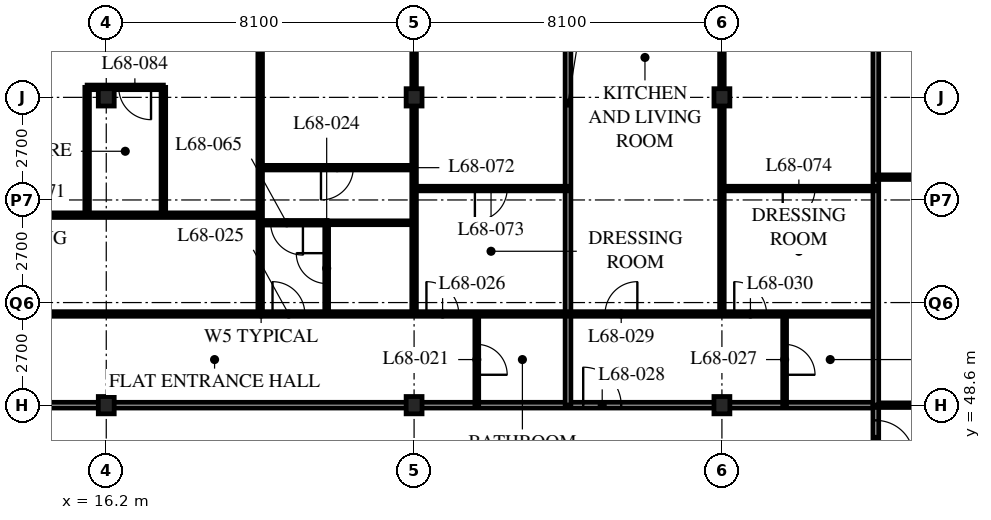
"""IFC4 building model, lengths in metres.
Left out: names, types, materials, properties, quantities, classifications, styles, units other than length and angle.
Written with IfcOpenShell. Run it as: python <this file> out.ifc"""

import sys

from ifc_helpers import new_model, si_unit, direction, frame, frame_2d, origin, origin_2d, place, context, subcontext, project, spatial, rectangle, i_section, extrude, element, fill, save


model = new_model("IFC4")
c1 = context("Model", 3, precision=1e-05, world=origin(), true_north=direction((0.0, 1.0)))
c2 = subcontext(c1, "Body", "Model", "MODEL_VIEW")
j1 = project(units=[si_unit("LENGTHUNIT", "METRE"), si_unit("PLANEANGLEUNIT", "RADIAN")], contexts=[c1])
p1 = place(None, origin())
s1 = spatial("IfcSite", under=j1, at=p1, CompositionType="ELEMENT")
p2 = place(p1, origin())
s2 = spatial("IfcBuilding", under=s1, at=p2, CompositionType="ELEMENT")
p3 = place(p2, frame((0.0, 0.0, 265.8)))
s3 = spatial("IfcBuildingStorey", under=s2, at=p3, CompositionType="ELEMENT", Elevation=265.8)
for number, where, z_axis, x_axis in (
    (1, (16.2, 48.6, 0.0), (0.0, 0.0, 1.0), (1.0, 0.0, 0.0)),
    (2, (16.2, 56.7, 0.0), (0.0, 0.0, 1.0), (1.0, 0.0, 0.0)),
    (3, (24.3, 48.6, 0.0), (0.0, 0.0, 1.0), (1.0, 0.0, 0.0)),
    (4, (24.3, 56.7, 0.0), (0.0, 0.0, 1.0), (1.0, 0.0, 0.0)),
    (5, (32.4, 48.6, 0.0), (0.0, 0.0, 1.0), (1.0, 0.0, 0.0)),
    (6, (32.4, 56.7, 0.0), (0.0, 0.0, 1.0), (1.0, 0.0, 0.0)),
):
    element("IfcColumn", number, at=place(p3, frame(where, z_axis=z_axis, x_axis=x_axis)), inside=s3, PredefinedType="COLUMN", context=c2, shape_type="SweptSolid", body=[
        extrude(i_section(OverallWidth=0.418, OverallDepth=0.456, WebThickness=0.042, FlangeThickness=0.067, FilletRadius=0.015, at=origin_2d()), origin(), (0.0, 0.0, 1.0), 3.9),
    ])
p4 = place(p3, frame((8.1, 48.6, 0.0), z_axis=(0.0, 0.0, 1.0), x_axis=(1.0, 0.0, 0.0)))
e7 = element("IfcWall", 7, at=p4, inside=s3, PredefinedType="PARTITIONING", context=c2, shape_type="SweptSolid", body=[
    extrude(rectangle(XDim=28.35, YDim=0.15, at=frame_2d((14.175, 0.0))), origin(), (0.0, 0.0, 1.0), 3.078),
])
p5 = place(p4, frame((4.45, 0.0, 0.0)))
e8 = element("IfcOpeningElement", 8, at=p5, cuts=e7, PredefinedType="OPENING", context=c2, shape_type="SweptSolid", body=[
    extrude(rectangle(XDim=1.0, YDim=2.1, at=frame_2d((0.5, 1.05))), frame((0.0, 0.085, 0.0), z_axis=(0.0, -1.0, 0.0), x_axis=(1.0, 0.0, 0.0)), (0.0, 0.0, 1.0), 0.17),
])
p6 = place(p4, frame((20.65, 0.0, 0.0)))
e9 = element("IfcOpeningElement", 9, at=p6, cuts=e7, PredefinedType="OPENING", context=c2, shape_type="SweptSolid", body=[
    extrude(rectangle(XDim=1.0, YDim=2.1, at=frame_2d((0.5, 1.05))), frame((0.0, 0.085, 0.0), z_axis=(0.0, -1.0, 0.0), x_axis=(1.0, 0.0, 0.0)), (0.0, 0.0, 1.0), 0.17),
])
p7 = place(p4, frame((1.525, 0.0, 0.0)))
e10 = element("IfcOpeningElement", 10, at=p7, cuts=e7, PredefinedType="OPENING", context=c2, shape_type="SweptSolid", body=[
    extrude(rectangle(XDim=1.0, YDim=2.1, at=frame_2d((0.5, 1.05))), frame((0.0, 0.085, 0.0), z_axis=(0.0, -1.0, 0.0), x_axis=(1.0, 0.0, 0.0)), (0.0, 0.0, 1.0), 0.17),
])
p8 = place(p3, frame((36.45, 46.8, 0.0), z_axis=(0.0, 0.0, 1.0), x_axis=(0.0, 1.0, 0.0)))
e11 = element("IfcWall", 11, at=p8, inside=s3, PredefinedType="PARTITIONING", context=c2, shape_type="SweptSolid", body=[
    extrude(rectangle(XDim=1.8, YDim=0.15, at=frame_2d((0.9, 0.0))), origin(), (0.0, 0.0, 1.0), 3.69),
])
p9 = place(p8, frame((0.4, 0.0, 0.0)))
e12 = element("IfcOpeningElement", 12, at=p9, cuts=e11, PredefinedType="OPENING", context=c2, shape_type="SweptSolid", body=[
    extrude(rectangle(XDim=1.0, YDim=2.1, at=frame_2d((0.5, 1.05))), frame((0.0, 0.085, 0.0), z_axis=(0.0, -1.0, 0.0), x_axis=(1.0, 0.0, 0.0)), (0.0, 0.0, 1.0), 0.17),
])
p10 = place(p3, frame((25.95, 48.6, 0.0), z_axis=(0.0, 0.0, 1.0), x_axis=(0.0, 1.0, 0.0)))
e13 = element("IfcWall", 13, at=p10, inside=s3, PredefinedType="PARTITIONING", context=c2, shape_type="SweptSolid", body=[
    extrude(rectangle(XDim=2.4, YDim=0.1, at=frame_2d((1.2, 0.0))), origin(), (0.0, 0.0, 1.0), 3.69),
])
p11 = place(p10, frame((0.8, 0.0, 0.0)))
e14 = element("IfcOpeningElement", 14, at=p11, cuts=e13, PredefinedType="OPENING", context=c2, shape_type="SweptSolid", body=[
    extrude(rectangle(XDim=0.8, YDim=2.1, at=frame_2d((0.4, 1.05))), frame((0.0, 0.06, 0.0), z_axis=(0.0, -1.0, 0.0), x_axis=(1.0, 0.0, 0.0)), (0.0, 0.0, 1.0), 0.12),
])
p12 = place(p3, frame((22.0, 51.0, 0.0), z_axis=(0.0, 0.0, 1.0), x_axis=(0.0, 1.0, 0.0)))
e15 = element("IfcWall", 15, at=p12, inside=s3, PredefinedType="PARTITIONING", context=c2, shape_type="SweptSolid", body=[
    extrude(rectangle(XDim=2.4, YDim=0.1, at=frame_2d((1.2, 0.0))), origin(), (0.0, 0.0, 1.0), 3.69),
])
p13 = place(p12, frame((0.8, 0.0, 0.0)))
e16 = element("IfcOpeningElement", 16, at=p13, cuts=e15, PredefinedType="OPENING", context=c2, shape_type="SweptSolid", body=[
    extrude(rectangle(XDim=0.8, YDim=2.1, at=frame_2d((0.4, 1.05))), frame((0.0, 0.06, 0.0), z_axis=(0.0, -1.0, 0.0), x_axis=(1.0, 0.0, 0.0)), (0.0, 0.0, 1.0), 0.12),
])
p14 = place(p3, frame((22.0, 53.4, 0.0), z_axis=(0.0, 0.0, 1.0), x_axis=(1.0, 0.0, 0.0)))
e17 = element("IfcWall", 17, at=p14, inside=s3, PredefinedType="PARTITIONING", context=c2, shape_type="SweptSolid", body=[
    extrude(rectangle(XDim=2.3, YDim=0.1, at=frame_2d((1.15, 0.0))), origin(), (0.0, 0.0, 1.0), 3.69),
])
p15 = place(p3, frame((20.25, 51.0, 0.0), z_axis=(0.0, 0.0, 1.0), x_axis=(0.0, 1.0, 0.0)))
e18 = element("IfcWall", 18, at=p15, inside=s3, PredefinedType="PARTITIONING", context=c2, shape_type="SweptSolid", body=[
    extrude(rectangle(XDim=13.5, YDim=0.12, at=frame_2d((6.75, 0.0))), origin(), (0.0, 0.0, 1.0), 3.69),
])
p16 = place(p3, frame((24.3, 51.0, 0.0), z_axis=(0.0, 0.0, 1.0), x_axis=(0.0, 1.0, 0.0)))
e19 = element("IfcWall", 19, at=p16, inside=s3, PredefinedType="PARTITIONING", context=c2, shape_type="SweptSolid", body=[
    extrude(rectangle(XDim=13.5, YDim=0.12, at=frame_2d((6.75, 0.0))), origin(), (0.0, 0.0, 1.0), 3.078),
])
p17 = place(p3, frame((28.35, 48.6, 0.0), z_axis=(0.0, 0.0, 1.0), x_axis=(0.0, 1.0, 0.0)))
e20 = element("IfcWall", 20, at=p17, inside=s3, PredefinedType="PARTITIONING", context=c2, shape_type="SweptSolid", body=[
    extrude(rectangle(XDim=15.9, YDim=0.15, at=frame_2d((7.95, 0.0))), origin(), (0.0, 0.0, 1.0), 3.69),
])
p18 = place(p3, frame((34.05, 48.6, 0.0), z_axis=(0.0, 0.0, 1.0), x_axis=(0.0, 1.0, 0.0)))
e21 = element("IfcWall", 21, at=p18, inside=s3, PredefinedType="PARTITIONING", context=c2, shape_type="SweptSolid", body=[
    extrude(rectangle(XDim=2.4, YDim=0.1, at=frame_2d((1.2, 0.0))), origin(), (0.0, 0.0, 1.0), 3.69),
])
p19 = place(p18, frame((0.8, 0.0, 0.0)))
e22 = element("IfcOpeningElement", 22, at=p19, cuts=e21, PredefinedType="OPENING", context=c2, shape_type="SweptSolid", body=[
    extrude(rectangle(XDim=0.8, YDim=2.1, at=frame_2d((0.4, 1.05))), frame((0.0, 0.06, 0.0), z_axis=(0.0, -1.0, 0.0), x_axis=(1.0, 0.0, 0.0)), (0.0, 0.0, 1.0), 0.12),
])
p20 = place(p3, frame((32.4, 51.0, 0.0), z_axis=(0.0, 0.0, 1.0), x_axis=(0.0, 1.0, 0.0)))
e23 = element("IfcWall", 23, at=p20, inside=s3, PredefinedType="PARTITIONING", context=c2, shape_type="SweptSolid", body=[
    extrude(rectangle(XDim=13.5, YDim=0.12, at=frame_2d((6.75, 0.0))), origin(), (0.0, 0.0, 1.0), 3.078),
])
p21 = place(p3, frame((4.1, 51.0, 0.0), z_axis=(0.0, 0.0, 1.0), x_axis=(1.0, 0.0, 0.0)))
e24 = element("IfcWall", 24, at=p21, inside=s3, PredefinedType="PARTITIONING", context=c2, shape_type="SweptSolid", body=[
    extrude(rectangle(XDim=32.35, YDim=0.12, at=frame_2d((16.175, 0.0))), origin(), (0.0, 0.0, 1.0), 3.69),
])
p22 = place(p21, frame((9.025, 0.0, 0.0)))
e25 = element("IfcOpeningElement", 25, at=p22, cuts=e24, PredefinedType="OPENING", context=c2, shape_type="SweptSolid", body=[
    extrude(rectangle(XDim=0.85, YDim=2.1, at=frame_2d((0.425, 1.05))), frame((0.0, 0.07, 0.0), z_axis=(0.0, -1.0, 0.0), x_axis=(1.0, 0.0, 0.0)), (0.0, 0.0, 1.0), 0.14),
])
p23 = place(p21, frame((16.475, 0.0, 0.0)))
e26 = element("IfcOpeningElement", 26, at=p23, cuts=e24, PredefinedType="OPENING", context=c2, shape_type="SweptSolid", body=[
    extrude(rectangle(XDim=0.85, YDim=2.1, at=frame_2d((0.425, 1.05))), frame((0.0, 0.07, 0.0), z_axis=(0.0, -1.0, 0.0), x_axis=(1.0, 0.0, 0.0)), (0.0, 0.0, 1.0), 0.14),
])
p24 = place(p21, frame((20.525, 0.0, 0.0)))
e27 = element("IfcOpeningElement", 27, at=p24, cuts=e24, PredefinedType="OPENING", context=c2, shape_type="SweptSolid", body=[
    extrude(rectangle(XDim=0.85, YDim=2.1, at=frame_2d((0.425, 1.05))), frame((0.0, 0.07, 0.0), z_axis=(0.0, -1.0, 0.0), x_axis=(1.0, 0.0, 0.0)), (0.0, 0.0, 1.0), 0.14),
])
p25 = place(p21, frame((25.225, 0.0, 0.0)))
e28 = element("IfcOpeningElement", 28, at=p25, cuts=e24, PredefinedType="OPENING", context=c2, shape_type="SweptSolid", body=[
    extrude(rectangle(XDim=0.85, YDim=2.1, at=frame_2d((0.425, 1.05))), frame((0.0, 0.07, 0.0), z_axis=(0.0, -1.0, 0.0), x_axis=(1.0, 0.0, 0.0)), (0.0, 0.0, 1.0), 0.14),
])
p26 = place(p21, frame((28.625, 0.0, 0.0)))
e29 = element("IfcOpeningElement", 29, at=p26, cuts=e24, PredefinedType="OPENING", context=c2, shape_type="SweptSolid", body=[
    extrude(rectangle(XDim=0.85, YDim=2.1, at=frame_2d((0.425, 1.05))), frame((0.0, 0.07, 0.0), z_axis=(0.0, -1.0, 0.0), x_axis=(1.0, 0.0, 0.0)), (0.0, 0.0, 1.0), 0.14),
])
p27 = place(p21, frame((6.725, 0.0, 0.0)))
e30 = element("IfcOpeningElement", 30, at=p27, cuts=e24, PredefinedType="OPENING", context=c2, shape_type="SweptSolid", body=[
    extrude(rectangle(XDim=0.85, YDim=2.1, at=frame_2d((0.425, 1.05))), frame((0.0, 0.07, 0.0), z_axis=(0.0, -1.0, 0.0), x_axis=(1.0, 0.0, 0.0)), (0.0, 0.0, 1.0), 0.14),
])
p28 = place(p21, frame((2.875, 0.0, 0.0)))
e31 = element("IfcOpeningElement", 31, at=p28, cuts=e24, PredefinedType="OPENING", context=c2, shape_type="SweptSolid", body=[
    extrude(rectangle(XDim=0.85, YDim=2.1, at=frame_2d((0.425, 1.05))), frame((0.0, 0.07, 0.0), z_axis=(0.0, -1.0, 0.0), x_axis=(1.0, 0.0, 0.0)), (0.0, 0.0, 1.0), 0.14),
])
p29 = place(p3, frame((36.45, 48.6, 0.0), z_axis=(0.0, 0.0, 1.0), x_axis=(1.0, 0.0, 0.0)))
e32 = element("IfcWall", 32, at=p29, inside=s3, PredefinedType="PARTITIONING", context=c2, shape_type="SweptSolid", body=[
    extrude(rectangle(XDim=6.45, YDim=0.12, at=frame_2d((3.225, 0.0))), origin(), (0.0, 0.0, 1.0), 3.078),
])
p30 = place(p29, frame((2.3, 0.0, 0.0)))
e33 = element("IfcOpeningElement", 33, at=p30, cuts=e32, PredefinedType="OPENING", context=c2, shape_type="SweptSolid", body=[
    extrude(rectangle(XDim=0.85, YDim=2.1, at=frame_2d((0.425, 1.05))), frame((0.0, 0.07, 0.0), z_axis=(0.0, -1.0, 0.0), x_axis=(1.0, 0.0, 0.0)), (0.0, 0.0, 1.0), 0.14),
])
p31 = place(p3, frame((36.45, 64.5, 0.0), z_axis=(0.0, 0.0, 1.0), x_axis=(0.0, -1.0, 0.0)))
e34 = element("IfcWall", 34, at=p31, inside=s3, PredefinedType="PARTITIONING", context=c2, shape_type="SweptSolid", body=[
    extrude(rectangle(XDim=15.9, YDim=0.15, at=frame_2d((7.95, 0.0))), origin(), (0.0, 0.0, 1.0), 3.69),
])
p32 = place(p3, frame((36.45, 54.6, 0.0), z_axis=(0.0, 0.0, 1.0), x_axis=(1.0, 0.0, 0.0)))
e35 = element("IfcWall", 35, at=p32, inside=s3, PredefinedType="PARTITIONING", context=c2, shape_type="SweptSolid", body=[
    extrude(rectangle(XDim=19.95, YDim=0.12, at=frame_2d((9.975, 0.0))), origin(), (0.0, 0.0, 1.0), 3.69),
])
p33 = place(p32, frame((1.675, 0.0, 0.0)))
e36 = element("IfcOpeningElement", 36, at=p33, cuts=e35, PredefinedType="OPENING", context=c2, shape_type="SweptSolid", body=[
    extrude(rectangle(XDim=0.85, YDim=2.1, at=frame_2d((0.425, 1.05))), frame((0.0, 0.07, 0.0), z_axis=(0.0, -1.0, 0.0), x_axis=(1.0, 0.0, 0.0)), (0.0, 0.0, 1.0), 0.14),
])
p34 = place(p3, frame((20.25, 53.4, 0.0), z_axis=(0.0, 0.0, 1.0), x_axis=(1.0, 0.0, 0.0)))
e37 = element("IfcWall", 37, at=p34, inside=s3, PredefinedType="PARTITIONING", context=c2, shape_type="SweptSolid", body=[
    extrude(rectangle(XDim=1.76, YDim=0.12, at=frame_2d((0.88, 0.0))), origin(), (0.0, 0.0, 1.0), 3.69),
])
p35 = place(p34, frame((0.275, 0.0, 0.0)))
e38 = element("IfcOpeningElement", 38, at=p35, cuts=e37, PredefinedType="OPENING", context=c2, shape_type="SweptSolid", body=[
    extrude(rectangle(XDim=0.85, YDim=2.1, at=frame_2d((0.425, 1.05))), frame((0.0, 0.07, 0.0), z_axis=(0.0, -1.0, 0.0), x_axis=(1.0, 0.0, 0.0)), (0.0, 0.0, 1.0), 0.14),
])
p36 = place(p3, frame((12.15, 53.6, 0.0), z_axis=(0.0, 0.0, 1.0), x_axis=(1.0, 0.0, 0.0)))
e39 = element("IfcWall", 39, at=p36, inside=s3, PredefinedType="PARTITIONING", context=c2, shape_type="SweptSolid", body=[
    extrude(rectangle(XDim=8.1, YDim=0.12, at=frame_2d((4.05, 0.0))), origin(), (0.0, 0.0, 1.0), 3.69),
])
p37 = place(p36, frame((1.675, 0.0, 0.0)))
e40 = element("IfcOpeningElement", 40, at=p37, cuts=e39, PredefinedType="OPENING", context=c2, shape_type="SweptSolid", body=[
    extrude(rectangle(XDim=0.85, YDim=2.1, at=frame_2d((0.425, 1.05))), frame((0.0, 0.07, 0.0), z_axis=(0.0, -1.0, 0.0), x_axis=(1.0, 0.0, 0.0)), (0.0, 0.0, 1.0), 0.14),
])
p38 = place(p3, frame((20.25, 54.85, 0.0), z_axis=(0.0, 0.0, 1.0), x_axis=(1.0, 0.0, 0.0)))
e41 = element("IfcWall", 41, at=p38, inside=s3, PredefinedType="PARTITIONING", context=c2, shape_type="SweptSolid", body=[
    extrude(rectangle(XDim=4.05, YDim=0.12, at=frame_2d((2.025, 0.0))), origin(), (0.0, 0.0, 1.0), 3.69),
])
p39 = place(p38, frame((1.6, 0.0, 0.0)))
e42 = element("IfcOpeningElement", 42, at=p39, cuts=e41, PredefinedType="OPENING", context=c2, shape_type="SweptSolid", body=[
    extrude(rectangle(XDim=0.85, YDim=2.1, at=frame_2d((0.425, 1.05))), frame((0.0, 0.07, 0.0), z_axis=(0.0, -1.0, 0.0), x_axis=(1.0, 0.0, 0.0)), (0.0, 0.0, 1.0), 0.14),
])
p40 = place(p3, frame((24.3, 54.3, 0.0), z_axis=(0.0, 0.0, 1.0), x_axis=(1.0, 0.0, 0.0)))
e43 = element("IfcWall", 43, at=p40, inside=s3, PredefinedType="PARTITIONING", context=c2, shape_type="SweptSolid", body=[
    extrude(rectangle(XDim=4.05, YDim=0.12, at=frame_2d((2.025, 0.0))), origin(), (0.0, 0.0, 1.0), 3.69),
])
p41 = place(p40, frame((1.6, 0.0, 0.0)))
e44 = element("IfcOpeningElement", 44, at=p41, cuts=e43, PredefinedType="OPENING", context=c2, shape_type="SweptSolid", body=[
    extrude(rectangle(XDim=0.85, YDim=2.1, at=frame_2d((0.425, 1.05))), frame((0.0, 0.07, 0.0), z_axis=(0.0, -1.0, 0.0), x_axis=(1.0, 0.0, 0.0)), (0.0, 0.0, 1.0), 0.14),
])
p42 = place(p3, frame((32.4, 54.3, 0.0), z_axis=(0.0, 0.0, 1.0), x_axis=(1.0, 0.0, 0.0)))
e45 = element("IfcWall", 45, at=p42, inside=s3, PredefinedType="PARTITIONING", context=c2, shape_type="SweptSolid", body=[
    extrude(rectangle(XDim=4.05, YDim=0.12, at=frame_2d((2.025, 0.0))), origin(), (0.0, 0.0, 1.0), 3.69),
])
p43 = place(p42, frame((1.6, 0.0, 0.0)))
e46 = element("IfcOpeningElement", 46, at=p43, cuts=e45, PredefinedType="OPENING", context=c2, shape_type="SweptSolid", body=[
    extrude(rectangle(XDim=0.85, YDim=2.1, at=frame_2d((0.425, 1.05))), frame((0.0, 0.07, 0.0), z_axis=(0.0, -1.0, 0.0), x_axis=(1.0, 0.0, 0.0)), (0.0, 0.0, 1.0), 0.14),
])
for number, where, z_axis, x_axis in (
    (47, (15.697, 53.6, 0.0), (0.0, 0.0, 1.0), (0.0, 1.0, 0.0)),
    (48, (17.703, 53.6, 0.0), (0.0, 0.0, 1.0), (0.0, 1.0, 0.0)),
):
    element("IfcWall", number, at=place(p3, frame(where, z_axis=z_axis, x_axis=x_axis)), inside=s3, PredefinedType="PARTITIONING", context=c2, shape_type="SweptSolid", body=[
        extrude(rectangle(XDim=3.363, YDim=0.12, at=frame_2d((1.681, 0.0))), origin(), (0.0, 0.0, 1.0), 3.69),
    ])
p44 = place(p3, frame((15.697, 56.963, 0.0), z_axis=(0.0, 0.0, 1.0), x_axis=(1.0, 0.0, 0.0)))
e49 = element("IfcWall", 49, at=p44, inside=s3, PredefinedType="PARTITIONING", context=c2, shape_type="SweptSolid", body=[
    extrude(rectangle(XDim=2.006, YDim=0.12, at=frame_2d((1.003, 0.0))), origin(), (0.0, 0.0, 1.0), 3.69),
])
p45 = place(p44, frame((0.831, 0.0, 0.0)))
e50 = element("IfcOpeningElement", 50, at=p45, cuts=e49, PredefinedType="OPENING", context=c2, shape_type="SweptSolid", body=[
    extrude(rectangle(XDim=0.85, YDim=2.1, at=frame_2d((0.425, 1.05))), frame((0.0, 0.07, 0.0), z_axis=(0.0, -1.0, 0.0), x_axis=(1.0, 0.0, 0.0)), (0.0, 0.0, 1.0), 0.14),
])
p46 = place(p11, origin())
e51 = element("IfcDoor", 51, at=p46, inside=s3, OperationType="SINGLE_SWING_RIGHT", PredefinedType="DOOR", context=c2, shape_type="SweptSolid", body=[
    extrude(rectangle(XDim=0.8, YDim=2.1, at=frame_2d((0.4, 1.05))), frame((0.0, 0.025, 0.0), z_axis=(0.0, -1.0, 0.0), x_axis=(1.0, 0.0, 0.0)), (0.0, 0.0, 1.0), 0.05),
])
fill(e14, e51)
p47 = place(p13, origin())
e52 = element("IfcDoor", 52, at=p47, inside=s3, OperationType="SINGLE_SWING_RIGHT", PredefinedType="DOOR", context=c2, shape_type="SweptSolid", body=[
    extrude(rectangle(XDim=0.8, YDim=2.1, at=frame_2d((0.4, 1.05))), frame((0.0, 0.025, 0.0), z_axis=(0.0, -1.0, 0.0), x_axis=(1.0, 0.0, 0.0)), (0.0, 0.0, 1.0), 0.05),
])
fill(e16, e52)
p48 = place(p23, origin())
e53 = element("IfcDoor", 53, at=p48, inside=s3, OperationType="SINGLE_SWING_LEFT", PredefinedType="DOOR", context=c2, shape_type="SweptSolid", body=[
    extrude(rectangle(XDim=0.85, YDim=2.1, at=frame_2d((0.425, 1.05))), frame((0.0, 0.025, 0.0), z_axis=(0.0, -1.0, 0.0), x_axis=(1.0, 0.0, 0.0)), (0.0, 0.0, 1.0), 0.05),
])
fill(e26, e53)
p49 = place(p24, origin())
e54 = element("IfcDoor", 54, at=p49, inside=s3, OperationType="SINGLE_SWING_LEFT", PredefinedType="DOOR", context=c2, shape_type="SweptSolid", body=[
    extrude(rectangle(XDim=0.85, YDim=2.1, at=frame_2d((0.425, 1.05))), frame((0.0, 0.025, 0.0), z_axis=(0.0, -1.0, 0.0), x_axis=(1.0, 0.0, 0.0)), (0.0, 0.0, 1.0), 0.05),
])
fill(e27, e54)
p50 = place(p19, origin())
e55 = element("IfcDoor", 55, at=p50, inside=s3, OperationType="SINGLE_SWING_RIGHT", PredefinedType="DOOR", context=c2, shape_type="SweptSolid", body=[
    extrude(rectangle(XDim=0.8, YDim=2.1, at=frame_2d((0.4, 1.05))), frame((0.0, 0.025, 0.0), z_axis=(0.0, -1.0, 0.0), x_axis=(1.0, 0.0, 0.0)), (0.0, 0.0, 1.0), 0.05),
])
fill(e22, e55)
p51 = place(p6, origin())
e56 = element("IfcDoor", 56, at=p51, inside=s3, OperationType="SINGLE_SWING_LEFT", PredefinedType="DOOR", context=c2, shape_type="SweptSolid", body=[
    extrude(rectangle(XDim=1.0, YDim=2.1, at=frame_2d((0.5, 1.05))), frame((0.0, 0.025, 0.0), z_axis=(0.0, -1.0, 0.0), x_axis=(1.0, 0.0, 0.0)), (0.0, 0.0, 1.0), 0.05),
])
fill(e9, e56)
p52 = place(p25, origin())
e57 = element("IfcDoor", 57, at=p52, inside=s3, OperationType="SINGLE_SWING_RIGHT", PredefinedType="DOOR", context=c2, shape_type="SweptSolid", body=[
    extrude(rectangle(XDim=0.85, YDim=2.1, at=frame_2d((0.425, 1.05))), frame((0.0, 0.025, 0.0), z_axis=(0.0, -1.0, 0.0), x_axis=(1.0, 0.0, 0.0)), (0.0, 0.0, 1.0), 0.05),
])
fill(e28, e57)
p53 = place(p26, origin())
e58 = element("IfcDoor", 58, at=p53, inside=s3, OperationType="SINGLE_SWING_LEFT", PredefinedType="DOOR", context=c2, shape_type="SweptSolid", body=[
    extrude(rectangle(XDim=0.85, YDim=2.1, at=frame_2d((0.425, 1.05))), frame((0.0, 0.025, 0.0), z_axis=(0.0, -1.0, 0.0), x_axis=(1.0, 0.0, 0.0)), (0.0, 0.0, 1.0), 0.05),
])
fill(e29, e58)
p54 = place(p9, origin())
e59 = element("IfcDoor", 59, at=p54, inside=s3, OperationType="SINGLE_SWING_RIGHT", PredefinedType="DOOR", context=c2, shape_type="SweptSolid", body=[
    extrude(rectangle(XDim=1.0, YDim=2.1, at=frame_2d((0.5, 1.05))), frame((0.0, 0.025, 0.0), z_axis=(0.0, -1.0, 0.0), x_axis=(1.0, 0.0, 0.0)), (0.0, 0.0, 1.0), 0.05),
])
fill(e12, e59)
p55 = place(p35, origin())
e60 = element("IfcDoor", 60, at=p55, inside=s3, OperationType="SINGLE_SWING_LEFT", PredefinedType="DOOR", context=c2, shape_type="SweptSolid", body=[
    extrude(rectangle(XDim=0.85, YDim=2.1, at=frame_2d((0.425, 1.05))), frame((0.0, 0.025, 0.0), z_axis=(0.0, -1.0, 0.0), x_axis=(1.0, 0.0, 0.0)), (0.0, 0.0, 1.0), 0.05),
])
fill(e38, e60)
p56 = place(p39, origin())
e61 = element("IfcDoor", 61, at=p56, inside=s3, OperationType="SINGLE_SWING_RIGHT", PredefinedType="DOOR", context=c2, shape_type="SweptSolid", body=[
    extrude(rectangle(XDim=0.85, YDim=2.1, at=frame_2d((0.425, 1.05))), frame((0.0, 0.025, 0.0), z_axis=(0.0, -1.0, 0.0), x_axis=(1.0, 0.0, 0.0)), (0.0, 0.0, 1.0), 0.05),
])
fill(e42, e61)
p57 = place(p41, origin())
e62 = element("IfcDoor", 62, at=p57, inside=s3, OperationType="SINGLE_SWING_RIGHT", PredefinedType="DOOR", context=c2, shape_type="SweptSolid", body=[
    extrude(rectangle(XDim=0.85, YDim=2.1, at=frame_2d((0.425, 1.05))), frame((0.0, 0.025, 0.0), z_axis=(0.0, -1.0, 0.0), x_axis=(1.0, 0.0, 0.0)), (0.0, 0.0, 1.0), 0.05),
])
fill(e44, e62)
p58 = place(p43, origin())
e63 = element("IfcDoor", 63, at=p58, inside=s3, OperationType="SINGLE_SWING_RIGHT", PredefinedType="DOOR", context=c2, shape_type="SweptSolid", body=[
    extrude(rectangle(XDim=0.85, YDim=2.1, at=frame_2d((0.425, 1.05))), frame((0.0, 0.025, 0.0), z_axis=(0.0, -1.0, 0.0), x_axis=(1.0, 0.0, 0.0)), (0.0, 0.0, 1.0), 0.05),
])
fill(e46, e63)
p59 = place(p45, origin())
e64 = element("IfcDoor", 64, at=p59, inside=s3, OperationType="SINGLE_SWING_LEFT", PredefinedType="DOOR", context=c2, shape_type="SweptSolid", body=[
    extrude(rectangle(XDim=0.85, YDim=2.1, at=frame_2d((0.425, 1.05))), frame((0.0, 0.025, 0.0), z_axis=(0.0, -1.0, 0.0), x_axis=(1.0, 0.0, 0.0)), (0.0, 0.0, 1.0), 0.05),
])
fill(e50, e64)
save(model, sys.argv[1])
